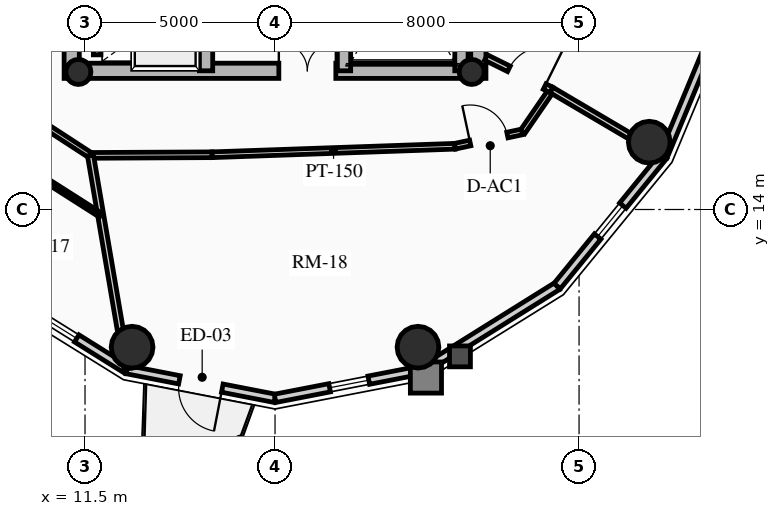
"""IFC4 building model, lengths in metres.
Left out: names, types, materials, properties, quantities, classifications, styles, units other than length and angle.
Written with IfcOpenShell. Run it as: python <this file> out.ifc"""

import sys

from ifc_helpers import new_model, si_unit, direction, frame, frame_2d, origin, origin_2d, place, context, subcontext, project, spatial, rectangle, circle, hollow_circle, extrude, source, transform, mapped, element, fill, save


model = new_model("IFC4")
c1 = context("Model", 3, precision=1e-05, world=origin(), true_north=direction((0.0, 1.0)))
c2 = subcontext(c1, "Body", "Model", "MODEL_VIEW")
j1 = project(units=[si_unit("LENGTHUNIT", "METRE"), si_unit("PLANEANGLEUNIT", "RADIAN")], contexts=[c1])
p1 = place(None, origin())
s1 = spatial("IfcSite", under=j1, at=p1, CompositionType="ELEMENT")
p2 = place(p1, origin())
s2 = spatial("IfcBuilding", under=s1, at=p2, CompositionType="ELEMENT")
p3 = place(p2, frame((0.0, 0.0, 226.05)))
s3 = spatial("IfcBuildingStorey", under=s2, at=p3, CompositionType="ELEMENT", Elevation=226.05)
for number, where, z_axis, x_axis in (
    (1, (11.15, 17.45, 0.0), (0.0, 0.0, 1.0), (0.0, 1.0, 0.0)),
    (2, (21.85, 17.45, 0.0), (0.0, 0.0, 1.0), (0.0, 1.0, 0.0)),
):
    element("IfcWall", number, at=place(p3, frame(where, z_axis=z_axis, x_axis=x_axis)), inside=s3, PredefinedType="SHEAR", context=c2, shape_type="SweptSolid", body=[
        extrude(rectangle(XDim=14.1, YDim=0.4, at=frame_2d((7.05, 0.0))), origin(), (0.0, 0.0, 1.0), 3.2),
    ])
p4 = place(p3, frame((11.15, 17.65, 0.0), z_axis=(0.0, 0.0, 1.0), x_axis=(1.0, 0.0, 0.0)))
e3 = element("IfcWall", 3, at=p4, inside=s3, PredefinedType="SHEAR", context=c2, shape_type="SweptSolid", body=[
    extrude(rectangle(XDim=10.7, YDim=0.4, at=frame_2d((5.35, 0.0))), origin(), (0.0, 0.0, 1.0), 3.2),
])
m1 = source(origin(), c2, "Body", "SweptSolid", [
    extrude(rectangle(XDim=1.5, YDim=2.02, at=frame_2d((0.75, 1.01))), frame((0.0, 0.21, 0.0), z_axis=(0.0, -1.0, 0.0), x_axis=(1.0, 0.0, 0.0)), (0.0, 0.0, 1.0), 0.42),
])
p5 = place(p4, frame((5.45, 0.0, 0.0)))
e4 = element("IfcOpeningElement", 4, at=p5, cuts=e3, PredefinedType="OPENING", context=c2, shape_type="MappedRepresentation", body=[
    mapped(m1, transform((0.0, 0.0, 0.0), x_axis=(1.0, 0.0, 0.0), y_axis=(0.0, 1.0, 0.0), z_axis=(0.0, 0.0, 1.0), scale=1.0)),
])
p6 = place(p3, frame((14.685, 17.65, 0.0), z_axis=(0.0, 0.0, 1.0), x_axis=(0.0, 1.0, 0.0)))
e5 = element("IfcWall", 5, at=p6, inside=s3, PredefinedType="SHEAR", context=c2, shape_type="SweptSolid", body=[
    extrude(rectangle(XDim=13.7, YDim=0.35, at=frame_2d((6.85, 0.0))), origin(), (0.0, 0.0, 1.0), 3.2),
])
m2 = source(origin(), c2, "Body", "SweptSolid", [
    extrude(rectangle(XDim=1.1, YDim=2.015, at=frame_2d((0.55, 1.007))), frame((0.0, 0.185, 0.0), z_axis=(0.0, -1.0, 0.0), x_axis=(1.0, 0.0, 0.0)), (0.0, 0.0, 1.0), 0.37),
])
p7 = place(p6, frame((4.85, 0.0, 0.0)))
e6 = element("IfcOpeningElement", 6, at=p7, cuts=e5, PredefinedType="OPENING", context=c2, shape_type="MappedRepresentation", body=[
    mapped(m2, transform((0.0, 0.0, 0.0), x_axis=(1.0, 0.0, 0.0), y_axis=(0.0, 1.0, 0.0), z_axis=(0.0, 0.0, 1.0), scale=1.0)),
])
p8 = place(p6, frame((0.625, 0.0, 0.0)))
e7 = element("IfcOpeningElement", 7, at=p8, cuts=e5, PredefinedType="OPENING", context=c2, shape_type="MappedRepresentation", body=[
    mapped(m2, transform((0.0, 0.0, 0.0), x_axis=(1.0, 0.0, 0.0), y_axis=(0.0, 1.0, 0.0), z_axis=(0.0, 0.0, 1.0), scale=1.0)),
])
p9 = place(p6, frame((2.625, 0.0, 0.0)))
e8 = element("IfcOpeningElement", 8, at=p9, cuts=e5, PredefinedType="OPENING", context=c2, shape_type="MappedRepresentation", body=[
    mapped(m2, transform((0.0, 0.0, 0.0), x_axis=(1.0, 0.0, 0.0), y_axis=(0.0, 1.0, 0.0), z_axis=(0.0, 0.0, 1.0), scale=1.0)),
])
m3 = source(origin(), c2, "Body", "SweptSolid", [
    extrude(rectangle(XDim=1.15, YDim=2.02, at=frame_2d((0.575, 1.01))), frame((0.0, 0.185, 0.0), z_axis=(0.0, -1.0, 0.0), x_axis=(1.0, 0.0, 0.0)), (0.0, 0.0, 1.0), 0.37),
])
p10 = place(p6, frame((7.27, 0.0, 0.0)))
e9 = element("IfcOpeningElement", 9, at=p10, cuts=e5, PredefinedType="OPENING", context=c2, shape_type="MappedRepresentation", body=[
    mapped(m3, transform((0.0, 0.0, 0.0), x_axis=(1.0, 0.0, 0.0), y_axis=(0.0, 1.0, 0.0), z_axis=(0.0, 0.0, 1.0), scale=1.0)),
])
p11 = place(p3, frame((18.315, 17.65, 0.0), z_axis=(0.0, 0.0, 1.0), x_axis=(0.0, 1.0, 0.0)))
e10 = element("IfcWall", 10, at=p11, inside=s3, PredefinedType="SHEAR", context=c2, shape_type="SweptSolid", body=[
    extrude(rectangle(XDim=9.6, YDim=0.35, at=frame_2d((4.8, 0.0))), origin(), (0.0, 0.0, 1.0), 3.2),
])
p12 = place(p11, frame((5.28, 0.0, 0.0)))
e11 = element("IfcOpeningElement", 11, at=p12, cuts=e10, PredefinedType="OPENING", context=c2, shape_type="MappedRepresentation", body=[
    mapped(m3, transform((0.0, 0.0, 0.0), x_axis=(1.0, 0.0, 0.0), y_axis=(0.0, 1.0, 0.0), z_axis=(0.0, 0.0, 1.0), scale=1.0)),
])
p13 = place(p3, frame((21.405, 17.65, 0.0), z_axis=(0.0, 0.0, 1.0), x_axis=(0.0, 1.0, 0.0)))
e12 = element("IfcWall", 12, at=p13, inside=s3, PredefinedType="SHEAR", context=c2, shape_type="SweptSolid", body=[
    extrude(rectangle(XDim=6.695, YDim=0.35, at=frame_2d((3.348, 0.0))), origin(), (0.0, 0.0, 1.0), 3.2),
])
for number, where, z_axis, x_axis in (
    (13, (11.325, 17.62, 0.0), (0.0, 0.0, 1.0), (1.0, 0.0, 0.0)),
    (14, (21.675, 17.62, 0.0), (0.0, 0.0, 1.0), (1.0, 0.0, 0.0)),
):
    element("IfcColumn", number, at=place(p3, frame(where, z_axis=z_axis, x_axis=x_axis)), inside=s3, PredefinedType="COLUMN", context=c2, shape_type="SweptSolid", body=[
        extrude(hollow_circle(Radius=0.33, WallThickness=0.025, at=origin_2d()), origin(), (0.0, 0.0, 1.0), 3.2),
    ])
for number, where, z_axis, x_axis in (
    (15, (12.739, 10.377, 0.0), (0.0, 0.0, 1.0), (1.0, 0.0, 0.0)),
    (16, (20.261, 10.377, 0.0), (0.0, 0.0, 1.0), (1.0, 0.0, 0.0)),
    (17, (26.347, 15.771, 0.0), (0.0, 0.0, 1.0), (1.0, 0.0, 0.0)),
):
    element("IfcColumn", number, at=place(p3, frame(where, z_axis=z_axis, x_axis=x_axis)), inside=s3, PredefinedType="USERDEFINED", context=c2, shape_type="SweptSolid", body=[
        extrude(circle(Radius=0.55, at=origin_2d()), origin(), (0.0, 0.0, 1.0), 3.2),
    ])
p14 = place(p3, frame((12.597, 9.787, 0.0), z_axis=(0.0, 0.0, 1.0), x_axis=(-0.848318713376, 0.529485939886, 0.0)))
e18 = element("IfcWall", 18, at=p14, inside=s3, PredefinedType="SOLIDWALL", context=c2, shape_type="SweptSolid", body=[
    extrude(rectangle(XDim=4.15, YDim=0.22, at=frame_2d((2.075, 0.0))), origin(), (0.0, 0.0, 1.0), 2.612),
])
m4 = source(origin(), c2, "Body", "SweptSolid", [
    extrude(rectangle(XDim=1.05, YDim=1.3, at=frame_2d((0.525, 0.65))), frame((0.0, 0.12, 0.0), z_axis=(0.0, -1.0, 0.0), x_axis=(1.0, 0.0, 0.0)), (0.0, 0.0, 1.0), 0.24),
])
p15 = place(p14, frame((1.55, 0.0, 0.65)))
e19 = element("IfcOpeningElement", 19, at=p15, cuts=e18, PredefinedType="OPENING", context=c2, shape_type="MappedRepresentation", body=[
    mapped(m4, transform((0.0, 0.0, 0.0), x_axis=(1.0, 0.0, 0.0), y_axis=(0.0, 1.0, 0.0), z_axis=(0.0, 0.0, 1.0), scale=1.0)),
])
p16 = place(p3, frame((16.5, 9.03, 0.0), z_axis=(0.0, 0.0, 1.0), x_axis=(-0.981700307484, 0.190432419211, 0.0)))
e20 = element("IfcWall", 20, at=p16, inside=s3, PredefinedType="SOLIDWALL", context=c2, shape_type="SweptSolid", body=[
    extrude(rectangle(XDim=3.976, YDim=0.22, at=frame_2d((1.988, 0.0))), origin(), (0.0, 0.0, 1.0), 2.612),
])
m5 = source(origin(), c2, "Body", "SweptSolid", [
    extrude(rectangle(XDim=1.15, YDim=2.005, at=frame_2d((0.575, 1.002))), frame((0.0, 0.12, 0.0), z_axis=(0.0, -1.0, 0.0), x_axis=(1.0, 0.0, 0.0)), (0.0, 0.0, 1.0), 0.24),
])
p17 = place(p16, frame((1.413, 0.0, 0.0)))
e21 = element("IfcOpeningElement", 21, at=p17, cuts=e20, PredefinedType="OPENING", context=c2, shape_type="MappedRepresentation", body=[
    mapped(m5, transform((0.0, 0.0, 0.0), x_axis=(1.0, 0.0, 0.0), y_axis=(0.0, 1.0, 0.0), z_axis=(0.0, 0.0, 1.0), scale=1.0)),
])
p18 = place(p3, frame((20.403, 9.787, 0.0), z_axis=(0.0, 0.0, 1.0), x_axis=(-0.981700307484, -0.190432419211, 0.0)))
e22 = element("IfcWall", 22, at=p18, inside=s3, PredefinedType="SOLIDWALL", context=c2, shape_type="SweptSolid", body=[
    extrude(rectangle(XDim=3.976, YDim=0.22, at=frame_2d((1.988, 0.0))), origin(), (0.0, 0.0, 1.0), 2.612),
])
p19 = place(p18, frame((1.463, 0.0, 0.65)))
e23 = element("IfcOpeningElement", 23, at=p19, cuts=e22, PredefinedType="OPENING", context=c2, shape_type="MappedRepresentation", body=[
    mapped(m4, transform((0.0, 0.0, 0.0), x_axis=(1.0, 0.0, 0.0), y_axis=(0.0, 1.0, 0.0), z_axis=(0.0, 0.0, 1.0), scale=1.0)),
])
p20 = place(p3, frame((23.924, 11.985, 0.0), z_axis=(0.0, 0.0, 1.0), x_axis=(-0.848318713376, -0.529485939886, 0.0)))
e24 = element("IfcWall", 24, at=p20, inside=s3, PredefinedType="SOLIDWALL", context=c2, shape_type="SweptSolid", body=[
    extrude(rectangle(XDim=4.15, YDim=0.22, at=frame_2d((2.075, 0.0))), origin(), (0.0, 0.0, 1.0), 2.612),
])
p21 = place(p3, frame((26.718, 15.407, 0.0), z_axis=(0.0, 0.0, 1.0), x_axis=(-0.632467166636, -0.774587169483, 0.0)))
e25 = element("IfcWall", 25, at=p21, inside=s3, PredefinedType="SOLIDWALL", context=c2, shape_type="SweptSolid", body=[
    extrude(rectangle(XDim=4.418, YDim=0.22, at=frame_2d((2.209, 0.0))), origin(), (0.0, 0.0, 1.0), 2.612),
])
p22 = place(p21, frame((1.684, 0.0, 0.65)))
e26 = element("IfcOpeningElement", 26, at=p22, cuts=e25, PredefinedType="OPENING", context=c2, shape_type="MappedRepresentation", body=[
    mapped(m4, transform((0.0, 0.0, 0.0), x_axis=(1.0, 0.0, 0.0), y_axis=(0.0, 1.0, 0.0), z_axis=(0.0, 0.0, 1.0), scale=1.0)),
])
p23 = place(p3, frame((28.512, 19.719, 0.0), z_axis=(0.0, 0.0, 1.0), x_axis=(-0.384036305194, -0.923317993052, 0.0)))
e27 = element("IfcWall", 27, at=p23, inside=s3, PredefinedType="SOLIDWALL", context=c2, shape_type="SweptSolid", body=[
    extrude(rectangle(XDim=4.671, YDim=0.22, at=frame_2d((2.335, 0.0))), origin(), (0.0, 0.0, 1.0), 2.612),
])
p24 = place(p3, frame((11.82, 18.07, 0.0), z_axis=(0.0, 0.0, 1.0), x_axis=(0.0, 1.0, 0.0)))
e28 = element("IfcWall", 28, at=p24, inside=s3, PredefinedType="SHEAR", context=c2, shape_type="SweptSolid", body=[
    extrude(rectangle(XDim=1.635, YDim=0.2, at=frame_2d((0.817, 0.0))), origin(), (0.0, 0.0, 1.0), 3.2),
])
p25 = place(p3, frame((10.358, 16.26, 0.0), z_axis=(0.0, 0.0, 1.0), x_axis=(0.838265397059, -0.545262435983, 0.0)))
e29 = element("IfcWall", 29, at=p25, inside=s3, PredefinedType="PARTITIONING", context=c2, shape_type="SweptSolid", body=[
    extrude(rectangle(XDim=1.534, YDim=0.15, at=frame_2d((0.767, 0.0))), origin(), (0.0, 0.0, 1.0), 2.545),
])
p26 = place(p3, frame((11.644, 15.424, 0.0), z_axis=(0.0, 0.0, 1.0), x_axis=(0.999986552511, 0.005186019339, 0.0)))
e30 = element("IfcWall", 30, at=p26, inside=s3, PredefinedType="PARTITIONING", context=c2, shape_type="SweptSolid", body=[
    extrude(rectangle(XDim=3.201, YDim=0.15, at=frame_2d((1.601, 0.0))), origin(), (0.0, 0.0, 1.0), 2.612),
])
p27 = place(p3, frame((14.845, 15.441, 0.0), z_axis=(0.0, 0.0, 1.0), x_axis=(0.99938794868, 0.034981824334, 0.0)))
e31 = element("IfcWall", 31, at=p27, inside=s3, PredefinedType="PARTITIONING", context=c2, shape_type="SweptSolid", body=[
    extrude(rectangle(XDim=6.393, YDim=0.15, at=frame_2d((3.196, 0.0))), origin(), (0.0, 0.0, 1.0), 2.545),
])
p28 = place(p3, frame((21.234, 15.664, 0.0), z_axis=(0.0, 0.0, 1.0), x_axis=(0.977931581182, 0.208925399431, 0.0)))
e32 = element("IfcWall", 32, at=p28, inside=s3, PredefinedType="PARTITIONING", context=c2, shape_type="SweptSolid", body=[
    extrude(rectangle(XDim=1.823, YDim=0.15, at=frame_2d((0.912, 0.0))), origin(), (0.0, 0.0, 1.0), 2.545),
])
m6 = source(origin(), c2, "Body", "SweptSolid", [
    extrude(rectangle(XDim=1.0, YDim=2.015, at=frame_2d((0.5, 1.007))), frame((0.0, 0.085, 0.0), z_axis=(0.0, -1.0, 0.0), x_axis=(1.0, 0.0, 0.0)), (0.0, 0.0, 1.0), 0.17),
])
p29 = place(p28, frame((0.412, 0.0, 0.0)))
e33 = element("IfcOpeningElement", 33, at=p29, cuts=e32, PredefinedType="OPENING", context=c2, shape_type="MappedRepresentation", body=[
    mapped(m6, transform((0.0, 0.0, 0.0), x_axis=(1.0, 0.0, 0.0), y_axis=(0.0, 1.0, 0.0), z_axis=(0.0, 0.0, 1.0), scale=1.0)),
])
p30 = place(p3, frame((23.017, 16.045, 0.0), z_axis=(0.0, 0.0, 1.0), x_axis=(0.566660656138, 0.823951273308, 0.0)))
e34 = element("IfcWall", 34, at=p30, inside=s3, PredefinedType="PARTITIONING", context=c2, shape_type="SweptSolid", body=[
    extrude(rectangle(XDim=1.336, YDim=0.15, at=frame_2d((0.668, 0.0))), origin(), (0.0, 0.0, 1.0), 2.612),
])
p31 = place(p3, frame((11.644, 15.424, 0.0), z_axis=(0.0, 0.0, 1.0), x_axis=(0.168350269159, -0.985727237563, 0.0)))
e35 = element("IfcWall", 35, at=p31, inside=s3, PredefinedType="PARTITIONING", context=c2, shape_type="SweptSolid", body=[
    extrude(rectangle(XDim=5.699, YDim=0.16, at=frame_2d((2.85, 0.0))), origin(), (0.0, 0.0, 1.0), 2.612),
])
p32 = place(p3, frame((23.774, 17.146, 0.0), z_axis=(0.0, 0.0, 1.0), x_axis=(0.861296601099, -0.508102514198, 0.0)))
e36 = element("IfcWall", 36, at=p32, inside=s3, PredefinedType="PARTITIONING", context=c2, shape_type="SweptSolid", body=[
    extrude(rectangle(XDim=3.399, YDim=0.16, at=frame_2d((1.7, 0.0))), origin(), (0.0, 0.0, 1.0), 2.612),
])
p33 = place(p3, frame((22.05, 18.0, 0.0), z_axis=(0.0, 0.0, 1.0), x_axis=(0.896045848613, -0.443961526692, 0.0)))
e37 = element("IfcWall", 37, at=p33, inside=s3, PredefinedType="PARTITIONING", context=c2, shape_type="SweptSolid", body=[
    extrude(rectangle(XDim=1.924, YDim=0.16, at=frame_2d((0.962, 0.0))), origin(), (0.0, 0.0, 1.0), 2.545),
])
m7 = source(origin(), c2, "Body", "SweptSolid", [
    extrude(rectangle(XDim=1.05, YDim=2.015, at=frame_2d((0.525, 1.007))), frame((0.0, 0.09, 0.0), z_axis=(0.0, -1.0, 0.0), x_axis=(1.0, 0.0, 0.0)), (0.0, 0.0, 1.0), 0.18),
])
p34 = place(p33, frame((0.674, 0.0, 0.0)))
e38 = element("IfcOpeningElement", 38, at=p34, cuts=e37, PredefinedType="OPENING", context=c2, shape_type="MappedRepresentation", body=[
    mapped(m7, transform((0.0, 0.0, 0.0), x_axis=(1.0, 0.0, 0.0), y_axis=(0.0, 1.0, 0.0), z_axis=(0.0, 0.0, 1.0), scale=1.0)),
])
p35 = place(p3, frame((10.002, 15.068, 0.0), z_axis=(0.0, 0.0, 1.0), x_axis=(0.843381706724, -0.537314895349, 0.0)))
e39 = element("IfcWall", 39, at=p35, inside=s3, PredefinedType="PARTITIONING", context=c2, shape_type="SweptSolid", body=[
    extrude(rectangle(XDim=2.265, YDim=0.125, at=frame_2d((1.132, 0.0))), origin(), (0.0, 0.0, 1.0), 2.545),
])
m8 = source(origin(), c2, "Body", "SweptSolid", [
    extrude(rectangle(XDim=1.05, YDim=1.3, at=frame_2d((0.525, 0.65))), frame((0.0, 0.03, 0.0), z_axis=(0.0, -1.0, 0.0), x_axis=(1.0, 0.0, 0.0)), (0.0, 0.0, 1.0), 0.06),
])
p36 = place(p15, origin())
e40 = element("IfcWindow", 40, at=p36, inside=s3, PartitioningType="SINGLE_PANEL", PredefinedType="WINDOW", context=c2, shape_type="MappedRepresentation", body=[
    mapped(m8, transform((0.0, 0.0, 0.0), x_axis=(1.0, 0.0, 0.0), y_axis=(0.0, 1.0, 0.0), z_axis=(0.0, 0.0, 1.0), scale=1.0)),
])
fill(e19, e40)
m9 = source(origin(), c2, "Body", "SweptSolid", [
    extrude(rectangle(XDim=1.15, YDim=2.005, at=frame_2d((0.575, 1.002))), frame((0.0, 0.025, 0.0), z_axis=(0.0, -1.0, 0.0), x_axis=(1.0, 0.0, 0.0)), (0.0, 0.0, 1.0), 0.05),
])
p37 = place(p17, origin())
e41 = element("IfcDoor", 41, at=p37, inside=s3, OperationType="SINGLE_SWING_LEFT", PredefinedType="DOOR", context=c2, shape_type="MappedRepresentation", body=[
    mapped(m9, transform((0.0, 0.0, 0.0), x_axis=(1.0, 0.0, 0.0), y_axis=(0.0, 1.0, 0.0), z_axis=(0.0, 0.0, 1.0), scale=1.0)),
])
fill(e21, e41)
p38 = place(p19, origin())
e42 = element("IfcWindow", 42, at=p38, inside=s3, PartitioningType="SINGLE_PANEL", PredefinedType="WINDOW", context=c2, shape_type="MappedRepresentation", body=[
    mapped(m8, transform((0.0, 0.0, 0.0), x_axis=(1.0, 0.0, 0.0), y_axis=(0.0, 1.0, 0.0), z_axis=(0.0, 0.0, 1.0), scale=1.0)),
])
fill(e23, e42)
p39 = place(p22, origin())
e43 = element("IfcWindow", 43, at=p39, inside=s3, PartitioningType="SINGLE_PANEL", PredefinedType="WINDOW", context=c2, shape_type="MappedRepresentation", body=[
    mapped(m8, transform((0.0, 0.0, 0.0), x_axis=(1.0, 0.0, 0.0), y_axis=(0.0, 1.0, 0.0), z_axis=(0.0, 0.0, 1.0), scale=1.0)),
])
fill(e26, e43)
m10 = source(origin(), c2, "Body", "SweptSolid", [
    extrude(rectangle(XDim=1.5, YDim=2.02, at=frame_2d((0.75, 1.01))), frame((0.0, 0.025, 0.0), z_axis=(0.0, -1.0, 0.0), x_axis=(1.0, 0.0, 0.0)), (0.0, 0.0, 1.0), 0.05),
])
p40 = place(p5, origin())
e44 = element("IfcDoor", 44, at=p40, inside=s3, OperationType="DOUBLE_DOOR_SINGLE_SWING", PredefinedType="DOOR", context=c2, shape_type="MappedRepresentation", body=[
    mapped(m10, transform((0.0, 0.0, 0.0), x_axis=(1.0, 0.0, 0.0), y_axis=(0.0, 1.0, 0.0), z_axis=(0.0, 0.0, 1.0), scale=1.0)),
])
fill(e4, e44)
m11 = source(origin(), c2, "Body", "SweptSolid", [
    extrude(rectangle(XDim=1.05, YDim=2.015, at=frame_2d((0.525, 1.007))), frame((0.0, 0.025, 0.0), z_axis=(0.0, -1.0, 0.0), x_axis=(1.0, 0.0, 0.0)), (0.0, 0.0, 1.0), 0.05),
])
p41 = place(p34, origin())
e45 = element("IfcDoor", 45, at=p41, inside=s3, OperationType="SINGLE_SWING_RIGHT", PredefinedType="DOOR", context=c2, shape_type="MappedRepresentation", body=[
    mapped(m11, transform((0.0, 0.0, 0.0), x_axis=(1.0, 0.0, 0.0), y_axis=(0.0, 1.0, 0.0), z_axis=(0.0, 0.0, 1.0), scale=1.0)),
])
fill(e38, e45)
m12 = source(origin(), c2, "Body", "SweptSolid", [
    extrude(rectangle(XDim=1.0, YDim=2.015, at=frame_2d((0.5, 1.007))), frame((0.0, 0.025, 0.0), z_axis=(0.0, -1.0, 0.0), x_axis=(1.0, 0.0, 0.0)), (0.0, 0.0, 1.0), 0.05),
])
p42 = place(p29, origin())
e46 = element("IfcDoor", 46, at=p42, inside=s3, OperationType="SINGLE_SWING_LEFT", PredefinedType="DOOR", context=c2, shape_type="MappedRepresentation", body=[
    mapped(m12, transform((0.0, 0.0, 0.0), x_axis=(1.0, 0.0, 0.0), y_axis=(0.0, 1.0, 0.0), z_axis=(0.0, 0.0, 1.0), scale=1.0)),
])
fill(e33, e46)
save(model, sys.argv[1])
